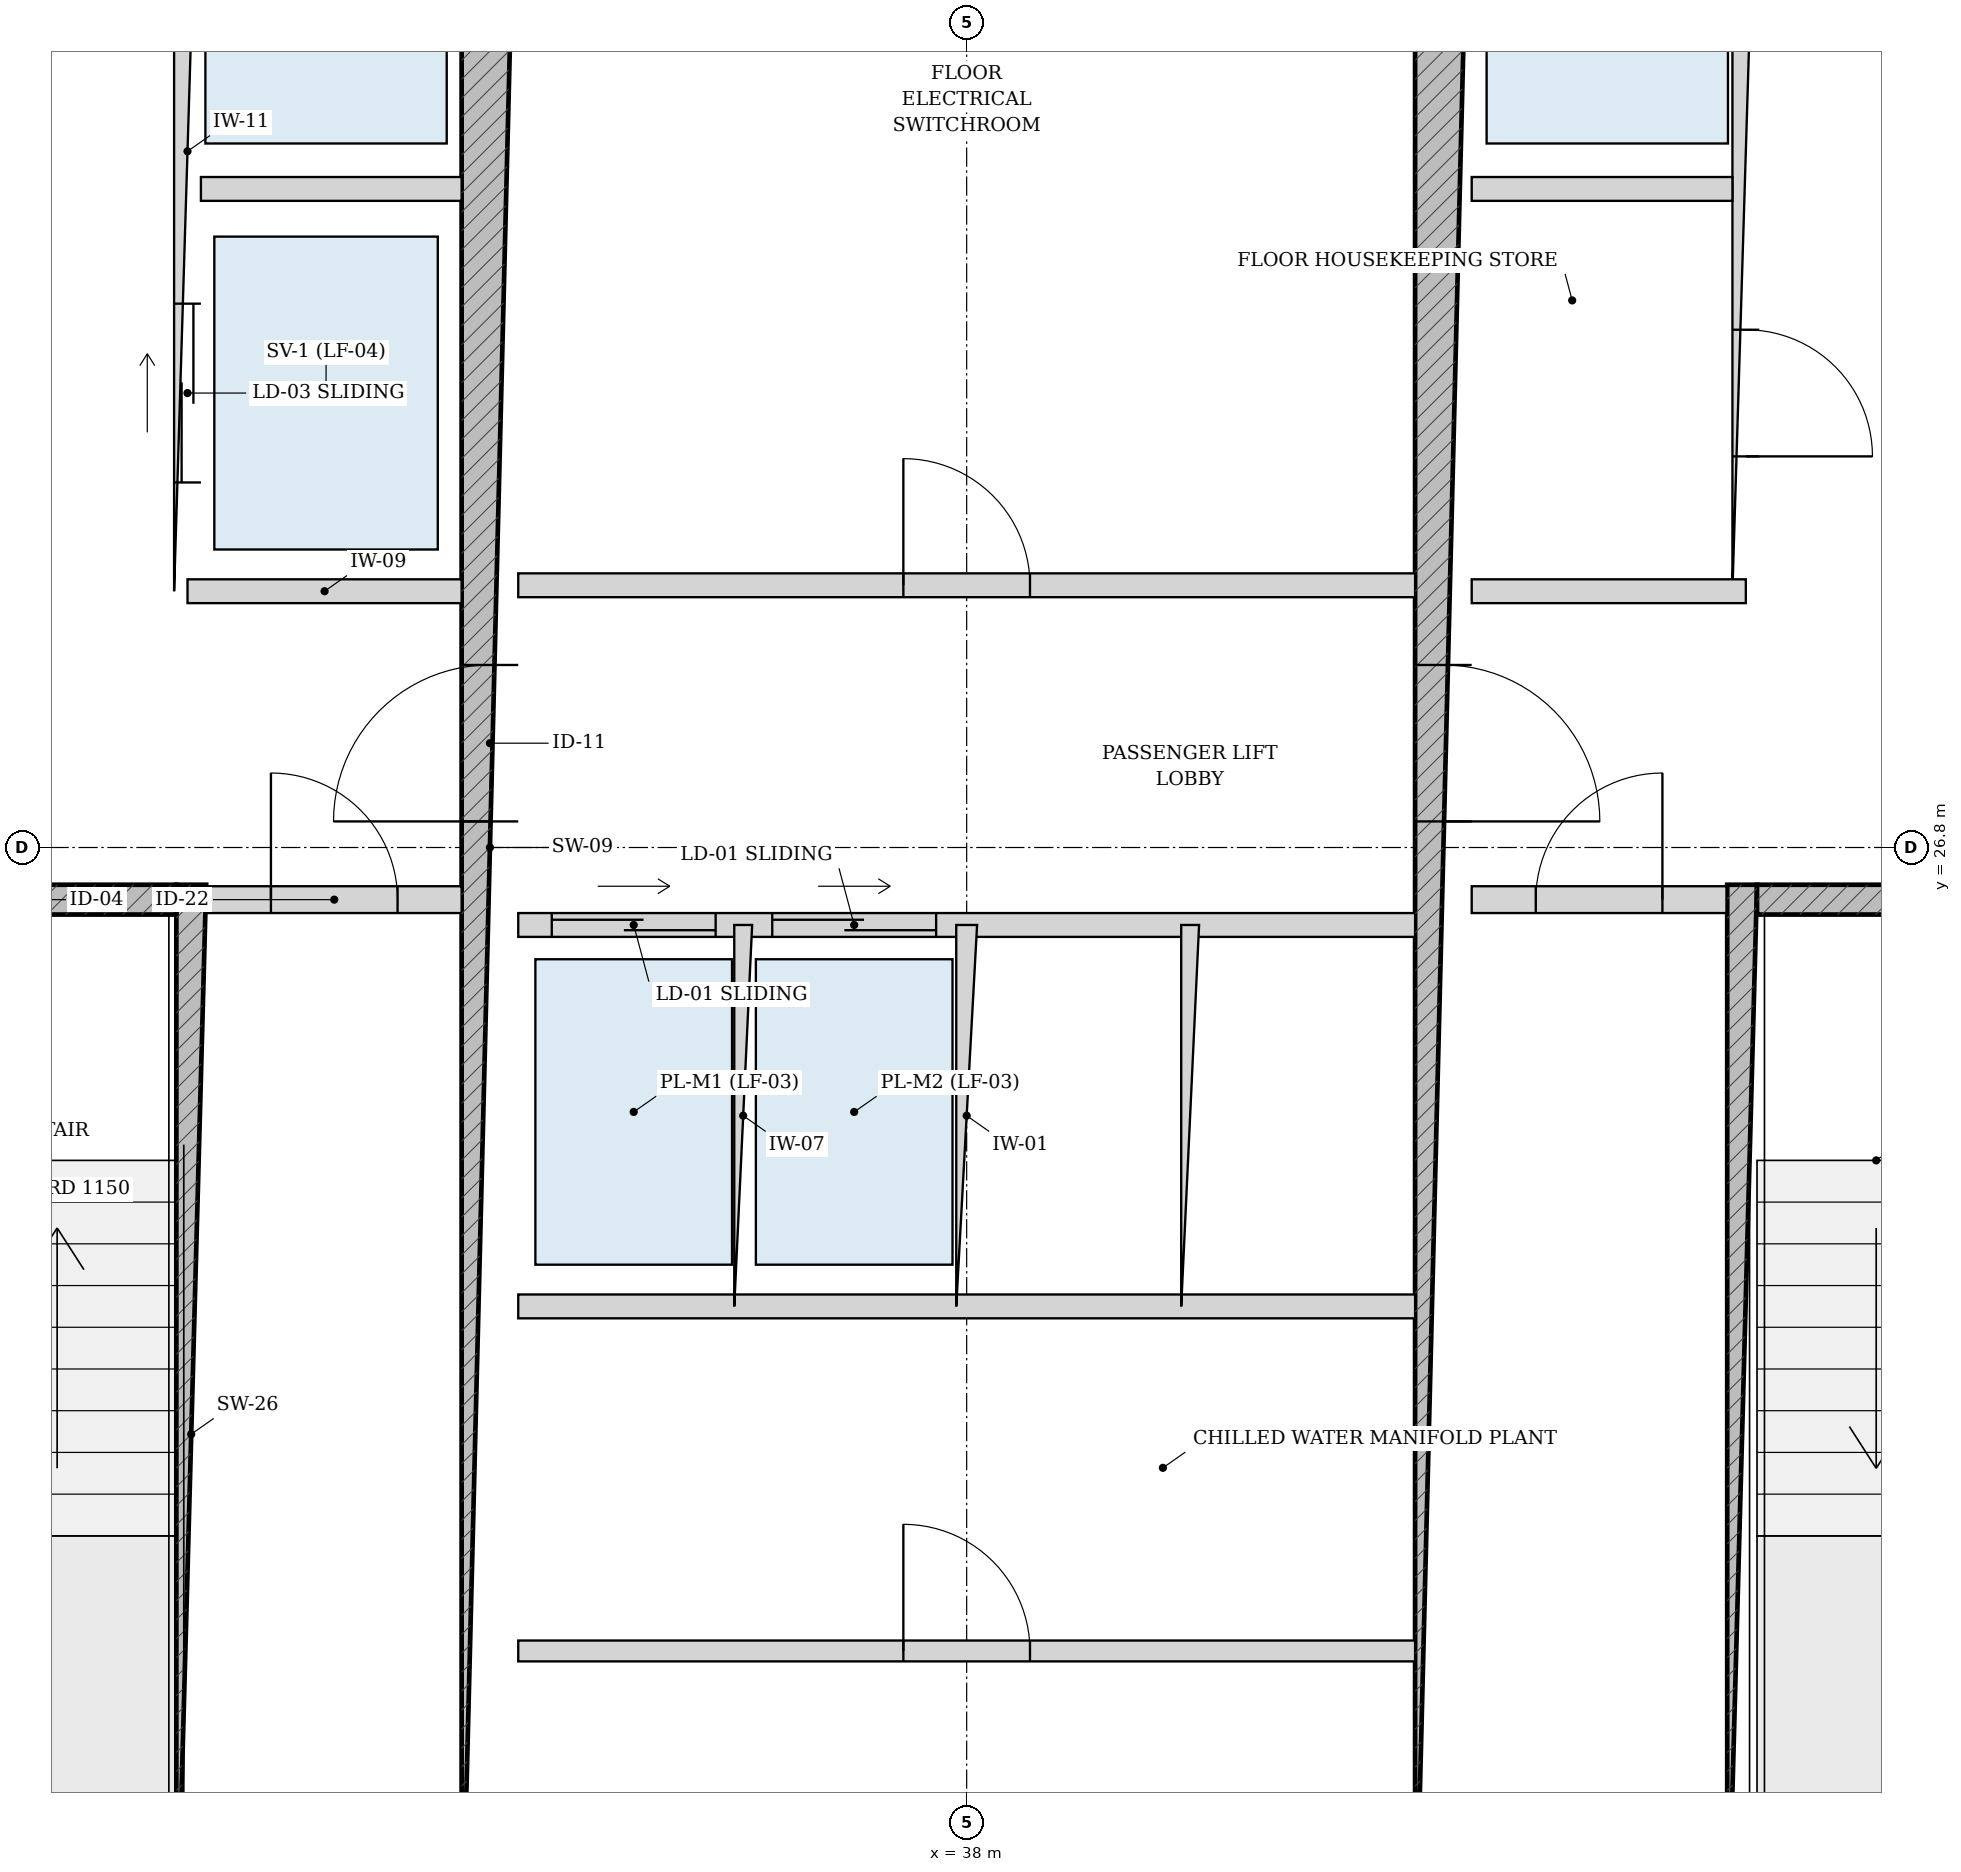
"""IFC4 building model, lengths in metres.
Left out: names, types, materials, properties, quantities, classifications, styles, units other than length and angle.
Written with IfcOpenShell. Run it as: python <this file> out.ifc"""

import sys

from ifc_helpers import new_model, si_unit, direction, frame, frame_2d, origin, place, context, subcontext, project, spatial, rectangle, extrude, source, transform, mapped, element, fill, save


model = new_model("IFC4")
c1 = context("Model", 3, precision=1e-05, world=origin(), true_north=direction((-0.2419218956, 0.970295726276)))
c2 = subcontext(c1, "Body", "Model", "MODEL_VIEW")
j1 = project(units=[si_unit("LENGTHUNIT", "METRE"), si_unit("PLANEANGLEUNIT", "RADIAN")], contexts=[c1])
p1 = place(None, origin())
s1 = spatial("IfcSite", under=j1, at=p1, CompositionType="ELEMENT")
p2 = place(p1, origin())
s2 = spatial("IfcBuilding", under=s1, at=p2, CompositionType="ELEMENT")
p3 = place(p2, frame((0.0, 0.0, 157.0)))
s3 = spatial("IfcBuildingStorey", under=s2, at=p3, CompositionType="ELEMENT", Elevation=157.0)
p4 = place(p3, frame((32.795, 19.175, 0.0), z_axis=(0.0, 0.0, 1.0), x_axis=(0.0, 1.0, 0.0)))
e1 = element("IfcWall", 1, at=p4, inside=s3, PredefinedType="SOLIDWALL", context=c2, shape_type="SweptSolid", body=[
    extrude(rectangle(XDim=7.375, YDim=0.2, at=frame_2d((3.688, 0.0))), origin(), (0.0, 0.0, 1.0), 3.33),
])
p5 = place(p3, frame((29.375, 26.45, 0.0), z_axis=(0.0, 0.0, 1.0), x_axis=(1.0, 0.0, 0.0)))
e2 = element("IfcWall", 2, at=p5, inside=s3, PredefinedType="SOLIDWALL", context=c2, shape_type="SweptSolid", body=[
    extrude(rectangle(XDim=3.32, YDim=0.2, at=frame_2d((1.66, 0.0))), origin(), (0.0, 0.0, 1.0), 3.33),
])
p6 = place(p5, frame((1.185, 0.0, 0.0)))
e3 = element("IfcOpeningElement", 3, at=p6, cuts=e2, PredefinedType="OPENING", context=c2, shape_type="SweptSolid", body=[
    extrude(rectangle(XDim=0.95, YDim=2.15, at=frame_2d((0.475, 1.075))), frame((0.0, 0.11, 0.0), z_axis=(0.0, -1.0, 0.0), x_axis=(1.0, 0.0, 0.0)), (0.0, 0.0, 1.0), 0.22),
])
p7 = place(p3, frame((43.205, 19.175, 0.0), z_axis=(0.0, 0.0, 1.0), x_axis=(0.0, 1.0, 0.0)))
e4 = element("IfcWall", 4, at=p7, inside=s3, PredefinedType="SOLIDWALL", context=c2, shape_type="SweptSolid", body=[
    extrude(rectangle(XDim=7.375, YDim=0.2, at=frame_2d((3.688, 0.0))), origin(), (0.0, 0.0, 1.0), 3.33),
])
p8 = place(p3, frame((43.305, 26.45, 0.0), z_axis=(0.0, 0.0, 1.0), x_axis=(1.0, 0.0, 0.0)))
e5 = element("IfcWall", 5, at=p8, inside=s3, PredefinedType="SOLIDWALL", context=c2, shape_type="SweptSolid", body=[
    extrude(rectangle(XDim=3.32, YDim=0.2, at=frame_2d((1.66, 0.0))), origin(), (0.0, 0.0, 1.0), 3.33),
])
p9 = place(p8, frame((1.185, 0.0, 0.0)))
e6 = element("IfcOpeningElement", 6, at=p9, cuts=e5, PredefinedType="OPENING", context=c2, shape_type="SweptSolid", body=[
    extrude(rectangle(XDim=0.95, YDim=2.15, at=frame_2d((0.475, 1.075))), frame((0.0, 0.11, 0.0), z_axis=(0.0, -1.0, 0.0), x_axis=(1.0, 0.0, 0.0)), (0.0, 0.0, 1.0), 0.22),
])
p10 = place(p3, frame((34.8, 19.175, 0.0), z_axis=(0.0, 0.0, 1.0), x_axis=(0.0, 1.0, 0.0)))
e7 = element("IfcWall", 7, at=p10, inside=s3, PredefinedType="SHEAR", context=c2, shape_type="SweptSolid", body=[
    extrude(rectangle(XDim=15.25, YDim=0.38, at=frame_2d((7.625, 0.0))), origin(), (0.0, 0.0, 1.0), 3.33),
])
p11 = place(p10, frame((7.8, 0.0, 0.0)))
e8 = element("IfcOpeningElement", 8, at=p11, cuts=e7, PredefinedType="OPENING", context=c2, shape_type="SweptSolid", body=[
    extrude(rectangle(XDim=1.05, YDim=2.15, at=frame_2d((0.525, 1.075))), frame((0.0, 0.2, 0.0), z_axis=(0.0, -1.0, 0.0), x_axis=(1.0, 0.0, 0.0)), (0.0, 0.0, 1.0), 0.4),
])
p12 = place(p3, frame((41.2, 19.175, 0.0), z_axis=(0.0, 0.0, 1.0), x_axis=(0.0, 1.0, 0.0)))
e9 = element("IfcWall", 9, at=p12, inside=s3, PredefinedType="SHEAR", context=c2, shape_type="SweptSolid", body=[
    extrude(rectangle(XDim=15.25, YDim=0.38, at=frame_2d((7.625, 0.0))), origin(), (0.0, 0.0, 1.0), 3.33),
])
p13 = place(p12, frame((7.8, 0.0, 0.0)))
e10 = element("IfcOpeningElement", 10, at=p13, cuts=e9, PredefinedType="OPENING", context=c2, shape_type="SweptSolid", body=[
    extrude(rectangle(XDim=1.05, YDim=2.15, at=frame_2d((0.525, 1.075))), frame((0.0, 0.2, 0.0), z_axis=(0.0, -1.0, 0.0), x_axis=(1.0, 0.0, 0.0)), (0.0, 0.0, 1.0), 0.4),
])
p14 = place(p3, frame((32.9, 26.45, 0.0), z_axis=(0.0, 0.0, 1.0), x_axis=(1.0, 0.0, 0.0)))
e11 = element("IfcWall", 11, at=p14, inside=s3, PredefinedType="PARTITIONING", context=c2, shape_type="SweptSolid", body=[
    extrude(rectangle(XDim=1.71, YDim=0.18, at=frame_2d((0.855, 0.0))), origin(), (0.0, 0.0, 1.0), 3.33),
])
p15 = place(p14, frame((0.43, 0.0, 0.0)))
e12 = element("IfcOpeningElement", 12, at=p15, cuts=e11, PredefinedType="OPENING", context=c2, shape_type="SweptSolid", body=[
    extrude(rectangle(XDim=0.85, YDim=2.1, at=frame_2d((0.425, 1.05))), frame((0.0, 0.1, 0.0), z_axis=(0.0, -1.0, 0.0), x_axis=(1.0, 0.0, 0.0)), (0.0, 0.0, 1.0), 0.2),
])
p16 = place(p3, frame((41.39, 26.45, 0.0), z_axis=(0.0, 0.0, 1.0), x_axis=(1.0, 0.0, 0.0)))
e13 = element("IfcWall", 13, at=p16, inside=s3, PredefinedType="PARTITIONING", context=c2, shape_type="SweptSolid", body=[
    extrude(rectangle(XDim=1.71, YDim=0.18, at=frame_2d((0.855, 0.0))), origin(), (0.0, 0.0, 1.0), 3.33),
])
p17 = place(p16, frame((0.43, 0.0, 0.0)))
e14 = element("IfcOpeningElement", 14, at=p17, cuts=e13, PredefinedType="OPENING", context=c2, shape_type="SweptSolid", body=[
    extrude(rectangle(XDim=0.85, YDim=2.1, at=frame_2d((0.425, 1.05))), frame((0.0, 0.1, 0.0), z_axis=(0.0, -1.0, 0.0), x_axis=(1.0, 0.0, 0.0)), (0.0, 0.0, 1.0), 0.2),
])
p18 = place(p3, frame((32.77, 28.52, 0.0), z_axis=(0.0, 0.0, 1.0), x_axis=(0.0, 1.0, 0.0)))
e15 = element("IfcWall", 15, at=p18, inside=s3, PredefinedType="PARTITIONING", context=c2, shape_type="SweptSolid", body=[
    extrude(rectangle(XDim=5.905, YDim=0.18, at=frame_2d((2.953, 0.0))), origin(), (0.0, 0.0, 1.0), 3.33),
])
p19 = place(p18, frame((3.655, 0.0, 0.0)))
e16 = element("IfcOpeningElement", 16, at=p19, cuts=e15, PredefinedType="OPENING", context=c2, shape_type="SweptSolid", body=[
    extrude(rectangle(XDim=1.15, YDim=2.2, at=frame_2d((0.575, 1.1))), frame((0.0, 0.1, 0.0), z_axis=(0.0, -1.0, 0.0), x_axis=(1.0, 0.0, 0.0)), (0.0, 0.0, 1.0), 0.2),
])
p20 = place(p18, frame((0.73, 0.0, 0.0)))
e17 = element("IfcOpeningElement", 17, at=p20, cuts=e15, PredefinedType="OPENING", context=c2, shape_type="SweptSolid", body=[
    extrude(rectangle(XDim=1.2, YDim=2.25, at=frame_2d((0.6, 1.125))), frame((0.0, 0.1, 0.0), z_axis=(0.0, -1.0, 0.0), x_axis=(1.0, 0.0, 0.0)), (0.0, 0.0, 1.0), 0.2),
])
p21 = place(p3, frame((32.86, 31.22, 0.0), z_axis=(0.0, 0.0, 1.0), x_axis=(1.0, 0.0, 0.0)))
e18 = element("IfcWall", 18, at=p21, inside=s3, PredefinedType="PARTITIONING", context=c2, shape_type="SweptSolid", body=[
    extrude(rectangle(XDim=1.75, YDim=0.16, at=frame_2d((0.875, 0.0))), origin(), (0.0, 0.0, 1.0), 3.33),
])
p22 = place(p3, frame((32.77, 28.52, 0.0), z_axis=(0.0, 0.0, 1.0), x_axis=(1.0, 0.0, 0.0)))
e19 = element("IfcWall", 19, at=p22, inside=s3, PredefinedType="PARTITIONING", context=c2, shape_type="SweptSolid", body=[
    extrude(rectangle(XDim=1.84, YDim=0.16, at=frame_2d((0.92, 0.0))), origin(), (0.0, 0.0, 1.0), 3.33),
])
p23 = place(p3, frame((43.23, 28.52, 0.0), z_axis=(0.0, 0.0, 1.0), x_axis=(0.0, 1.0, 0.0)))
e20 = element("IfcWall", 20, at=p23, inside=s3, PredefinedType="PARTITIONING", context=c2, shape_type="SweptSolid", body=[
    extrude(rectangle(XDim=5.905, YDim=0.18, at=frame_2d((2.953, 0.0))), origin(), (0.0, 0.0, 1.0), 3.33),
])
p24 = place(p23, frame((0.905, 0.0, 0.0)))
e21 = element("IfcOpeningElement", 21, at=p24, cuts=e20, PredefinedType="OPENING", context=c2, shape_type="SweptSolid", body=[
    extrude(rectangle(XDim=0.85, YDim=2.1, at=frame_2d((0.425, 1.05))), frame((0.0, 0.1, 0.0), z_axis=(0.0, -1.0, 0.0), x_axis=(1.0, 0.0, 0.0)), (0.0, 0.0, 1.0), 0.2),
])
p25 = place(p23, frame((3.655, 0.0, 0.0)))
e22 = element("IfcOpeningElement", 22, at=p25, cuts=e20, PredefinedType="OPENING", context=c2, shape_type="SweptSolid", body=[
    extrude(rectangle(XDim=1.15, YDim=2.2, at=frame_2d((0.575, 1.1))), frame((0.0, 0.1, 0.0), z_axis=(0.0, -1.0, 0.0), x_axis=(1.0, 0.0, 0.0)), (0.0, 0.0, 1.0), 0.2),
])
p26 = place(p3, frame((41.39, 31.22, 0.0), z_axis=(0.0, 0.0, 1.0), x_axis=(1.0, 0.0, 0.0)))
e23 = element("IfcWall", 23, at=p26, inside=s3, PredefinedType="PARTITIONING", context=c2, shape_type="SweptSolid", body=[
    extrude(rectangle(XDim=1.75, YDim=0.16, at=frame_2d((0.875, 0.0))), origin(), (0.0, 0.0, 1.0), 3.33),
])
p27 = place(p3, frame((41.39, 28.52, 0.0), z_axis=(0.0, 0.0, 1.0), x_axis=(1.0, 0.0, 0.0)))
e24 = element("IfcWall", 24, at=p27, inside=s3, PredefinedType="PARTITIONING", context=c2, shape_type="SweptSolid", body=[
    extrude(rectangle(XDim=1.84, YDim=0.16, at=frame_2d((0.92, 0.0))), origin(), (0.0, 0.0, 1.0), 3.33),
])
p28 = place(p3, frame((34.99, 28.56, 0.0), z_axis=(0.0, 0.0, 1.0), x_axis=(1.0, 0.0, 0.0)))
e25 = element("IfcWall", 25, at=p28, inside=s3, PredefinedType="PARTITIONING", context=c2, shape_type="SweptSolid", body=[
    extrude(rectangle(XDim=6.02, YDim=0.16, at=frame_2d((3.01, 0.0))), origin(), (0.0, 0.0, 1.0), 3.33),
])
p29 = place(p28, frame((2.585, 0.0, 0.0)))
e26 = element("IfcOpeningElement", 26, at=p29, cuts=e25, PredefinedType="OPENING", context=c2, shape_type="SweptSolid", body=[
    extrude(rectangle(XDim=0.85, YDim=2.1, at=frame_2d((0.425, 1.05))), frame((0.0, 0.09, 0.0), z_axis=(0.0, -1.0, 0.0), x_axis=(1.0, 0.0, 0.0)), (0.0, 0.0, 1.0), 0.18),
])
p30 = place(p3, frame((34.99, 26.28, 0.0), z_axis=(0.0, 0.0, 1.0), x_axis=(1.0, 0.0, 0.0)))
e27 = element("IfcWall", 27, at=p30, inside=s3, PredefinedType="PARTITIONING", context=c2, shape_type="SweptSolid", body=[
    extrude(rectangle(XDim=6.02, YDim=0.16, at=frame_2d((3.01, 0.0))), origin(), (0.0, 0.0, 1.0), 3.33),
])
p31 = place(p30, frame((0.225, 0.0, 0.0)))
e28 = element("IfcOpeningElement", 28, at=p31, cuts=e27, PredefinedType="OPENING", context=c2, shape_type="SweptSolid", body=[
    extrude(rectangle(XDim=1.1, YDim=2.2, at=frame_2d((0.55, 1.1))), frame((0.0, 0.09, 0.0), z_axis=(0.0, -1.0, 0.0), x_axis=(1.0, 0.0, 0.0)), (0.0, 0.0, 1.0), 0.18),
])
p32 = place(p30, frame((1.705, 0.0, 0.0)))
e29 = element("IfcOpeningElement", 29, at=p32, cuts=e27, PredefinedType="OPENING", context=c2, shape_type="SweptSolid", body=[
    extrude(rectangle(XDim=1.1, YDim=2.2, at=frame_2d((0.55, 1.1))), frame((0.0, 0.09, 0.0), z_axis=(0.0, -1.0, 0.0), x_axis=(1.0, 0.0, 0.0)), (0.0, 0.0, 1.0), 0.18),
])
p33 = place(p3, frame((34.99, 23.72, 0.0), z_axis=(0.0, 0.0, 1.0), x_axis=(1.0, 0.0, 0.0)))
e30 = element("IfcWall", 30, at=p33, inside=s3, PredefinedType="PARTITIONING", context=c2, shape_type="SweptSolid", body=[
    extrude(rectangle(XDim=6.02, YDim=0.16, at=frame_2d((3.01, 0.0))), origin(), (0.0, 0.0, 1.0), 3.33),
])
p34 = place(p3, frame((36.5, 23.72, 0.0), z_axis=(0.0, 0.0, 1.0), x_axis=(0.0, 1.0, 0.0)))
e31 = element("IfcWall", 31, at=p34, inside=s3, PredefinedType="PARTITIONING", context=c2, shape_type="SweptSolid", body=[
    extrude(rectangle(XDim=2.56, YDim=0.12, at=frame_2d((1.28, 0.0))), origin(), (0.0, 0.0, 1.0), 3.33),
])
p35 = place(p3, frame((38.0, 23.72, 0.0), z_axis=(0.0, 0.0, 1.0), x_axis=(0.0, 1.0, 0.0)))
e32 = element("IfcWall", 32, at=p35, inside=s3, PredefinedType="PARTITIONING", context=c2, shape_type="SweptSolid", body=[
    extrude(rectangle(XDim=2.56, YDim=0.14, at=frame_2d((1.28, 0.0))), origin(), (0.0, 0.0, 1.0), 3.33),
])
p36 = place(p3, frame((39.5, 23.72, 0.0), z_axis=(0.0, 0.0, 1.0), x_axis=(0.0, 1.0, 0.0)))
e33 = element("IfcWall", 33, at=p36, inside=s3, PredefinedType="PARTITIONING", context=c2, shape_type="SweptSolid", body=[
    extrude(rectangle(XDim=2.56, YDim=0.12, at=frame_2d((1.28, 0.0))), origin(), (0.0, 0.0, 1.0), 3.33),
])
p37 = place(p3, frame((34.99, 21.407, 0.0), z_axis=(0.0, 0.0, 1.0), x_axis=(1.0, 0.0, 0.0)))
e34 = element("IfcWall", 34, at=p37, inside=s3, PredefinedType="PARTITIONING", context=c2, shape_type="SweptSolid", body=[
    extrude(rectangle(XDim=6.02, YDim=0.14, at=frame_2d((3.01, 0.0))), origin(), (0.0, 0.0, 1.0), 3.33),
])
p38 = place(p37, frame((2.585, 0.0, 0.0)))
e35 = element("IfcOpeningElement", 35, at=p38, cuts=e34, PredefinedType="OPENING", context=c2, shape_type="SweptSolid", body=[
    extrude(rectangle(XDim=0.85, YDim=2.1, at=frame_2d((0.425, 1.05))), frame((0.0, 0.08, 0.0), z_axis=(0.0, -1.0, 0.0), x_axis=(1.0, 0.0, 0.0)), (0.0, 0.0, 1.0), 0.16),
])
m1 = source(origin(), c2, "Body", "SweptSolid", [
    extrude(rectangle(XDim=1.05, YDim=2.15, at=frame_2d((0.525, 1.075))), frame((0.0, 0.025, 0.0), z_axis=(0.0, -1.0, 0.0), x_axis=(1.0, 0.0, 0.0)), (0.0, 0.0, 1.0), 0.05),
])
p39 = place(p11, origin())
e36 = element("IfcDoor", 36, at=p39, inside=s3, OperationType="SINGLE_SWING_LEFT", PredefinedType="DOOR", context=c2, shape_type="MappedRepresentation", body=[
    mapped(m1, transform((0.0, 0.0, 0.0), scale=1.0)),
])
fill(e8, e36)
p40 = place(p13, frame((1.05, 0.0, 0.0), z_axis=(0.0, 0.0, 1.0), x_axis=(-1.0, 0.0, 0.0)))
e37 = element("IfcDoor", 37, at=p40, inside=s3, OperationType="SINGLE_SWING_RIGHT", PredefinedType="DOOR", context=c2, shape_type="MappedRepresentation", body=[
    mapped(m1, transform((0.0, 0.0, 0.0), scale=1.0)),
])
fill(e10, e37)
m2 = source(origin(), c2, "Body", "SweptSolid", [
    extrude(rectangle(XDim=0.85, YDim=2.1, at=frame_2d((0.425, 1.05))), frame((0.0, 0.025, 0.0), z_axis=(0.0, -1.0, 0.0), x_axis=(1.0, 0.0, 0.0)), (0.0, 0.0, 1.0), 0.05),
])
p41 = place(p15, origin())
e38 = element("IfcDoor", 38, at=p41, inside=s3, OperationType="SINGLE_SWING_LEFT", PredefinedType="DOOR", context=c2, shape_type="MappedRepresentation", body=[
    mapped(m2, transform((0.0, 0.0, 0.0), scale=1.0)),
])
fill(e12, e38)
p42 = place(p17, origin())
e39 = element("IfcDoor", 39, at=p42, inside=s3, OperationType="SINGLE_SWING_RIGHT", PredefinedType="DOOR", context=c2, shape_type="MappedRepresentation", body=[
    mapped(m2, transform((0.0, 0.0, 0.0), scale=1.0)),
])
fill(e14, e39)
p43 = place(p24, frame((0.85, 0.0, 0.0), z_axis=(0.0, 0.0, 1.0), x_axis=(-1.0, 0.0, 0.0)))
e40 = element("IfcDoor", 40, at=p43, inside=s3, OperationType="SINGLE_SWING_RIGHT", PredefinedType="DOOR", context=c2, shape_type="MappedRepresentation", body=[
    mapped(m2, transform((0.0, 0.0, 0.0), scale=1.0)),
])
fill(e21, e40)
p44 = place(p29, origin())
e41 = element("IfcDoor", 41, at=p44, inside=s3, OperationType="SINGLE_SWING_LEFT", PredefinedType="DOOR", context=c2, shape_type="MappedRepresentation", body=[
    mapped(m2, transform((0.0, 0.0, 0.0), scale=1.0)),
])
fill(e26, e41)
p45 = place(p38, origin())
e42 = element("IfcDoor", 42, at=p45, inside=s3, OperationType="SINGLE_SWING_LEFT", PredefinedType="DOOR", context=c2, shape_type="MappedRepresentation", body=[
    mapped(m2, transform((0.0, 0.0, 0.0), scale=1.0)),
])
fill(e35, e42)
m3 = source(origin(), c2, "Body", "SweptSolid", [
    extrude(rectangle(XDim=1.2, YDim=2.25, at=frame_2d((0.6, 1.125))), frame((0.0, 0.025, 0.0), z_axis=(0.0, -1.0, 0.0), x_axis=(1.0, 0.0, 0.0)), (0.0, 0.0, 1.0), 0.05),
])
p46 = place(p20, origin())
e43 = element("IfcDoor", 43, at=p46, inside=s3, OperationType="DOUBLE_DOOR_SLIDING", PredefinedType="DOOR", context=c2, shape_type="MappedRepresentation", body=[
    mapped(m3, transform((0.0, 0.0, 0.0), scale=1.0)),
])
fill(e17, e43)
m4 = source(origin(), c2, "Body", "SweptSolid", [
    extrude(rectangle(XDim=1.1, YDim=2.2, at=frame_2d((0.55, 1.1))), frame((0.0, 0.025, 0.0), z_axis=(0.0, -1.0, 0.0), x_axis=(1.0, 0.0, 0.0)), (0.0, 0.0, 1.0), 0.05),
])
p47 = place(p31, origin())
e44 = element("IfcDoor", 44, at=p47, inside=s3, OperationType="DOUBLE_DOOR_SLIDING", PredefinedType="DOOR", context=c2, shape_type="MappedRepresentation", body=[
    mapped(m4, transform((0.0, 0.0, 0.0), scale=1.0)),
])
fill(e28, e44)
p48 = place(p32, origin())
e45 = element("IfcDoor", 45, at=p48, inside=s3, OperationType="DOUBLE_DOOR_SLIDING", PredefinedType="DOOR", context=c2, shape_type="MappedRepresentation", body=[
    mapped(m4, transform((0.0, 0.0, 0.0), scale=1.0)),
])
fill(e29, e45)
save(model, sys.argv[1])
